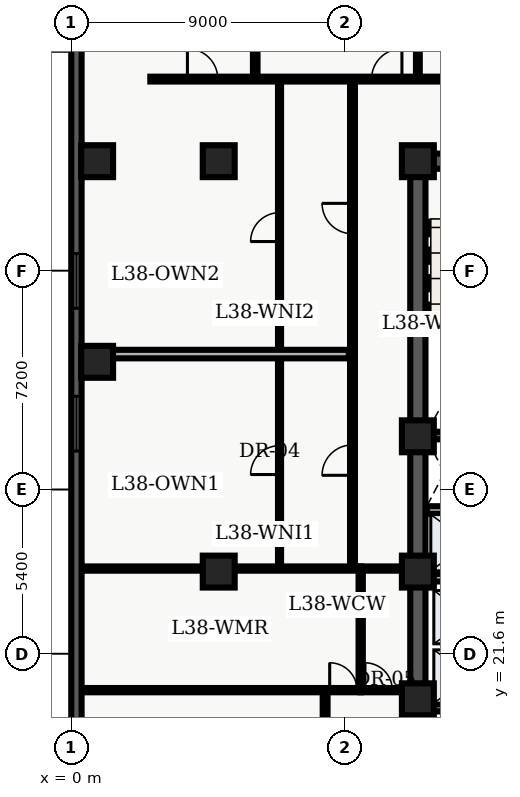
"""IFC4 building model, lengths in metres.
Left out: names, types, materials, properties, quantities, classifications, styles, units other than length and angle.
Written with IfcOpenShell. Run it as: python <this file> out.ifc"""

import sys

from ifc_helpers import new_model, entity, si_unit, converted_unit, direction, frame, origin_with_axes, origin_2d_with_axis, place, context, subcontext, project, spatial, polyline, rectangle, outline, extrude, element, fill, save


model = new_model("IFC4")
c1 = context("Model", 3, precision=1e-05, world=origin_with_axes(), true_north=direction((0.0, 1.0)))
c2 = subcontext(c1, "Body", "Model", "MODEL_VIEW")
j1 = project(units=[si_unit("LENGTHUNIT", "METRE"), converted_unit("PLANEANGLEUNIT", "DEGREE", entity("IfcPlaneAngleMeasure", 0.017), si_unit("PLANEANGLEUNIT", "RADIAN"), dimensions=[0, 0, 0, 0, 0, 0, 0])], contexts=[c1])
p1 = place(None, origin_with_axes())
s1 = spatial("IfcSite", under=j1, at=p1, CompositionType="ELEMENT")
p2 = place(p1, origin_with_axes())
s2 = spatial("IfcBuilding", under=s1, at=p2, CompositionType="ELEMENT")
p3 = place(p2, frame((0.0, 0.0, 156.3), z_axis=(0.0, 0.0, 1.0), x_axis=(1.0, 0.0, 0.0)))
s3 = spatial("IfcBuildingStorey", under=s2, at=p3, CompositionType="ELEMENT", Elevation=156.3)
p4 = place(p3, frame((11.4, 10.8, 0.0), z_axis=(0.0, 0.0, 1.0), x_axis=(0.0, 1.0, 0.0)))
e1 = element("IfcWall", 1, at=p4, inside=s3, PredefinedType="SHEAR", context=c2, shape_type="SweptSolid", body=[
    extrude(outline(polyline([(0.0, -0.25), (27.0, -0.25), (27.0, 0.25), (0.0, 0.25), (0.0, -0.25)])), origin_with_axes(), (0.0, 0.0, 1.0), 3.66),
])
p5 = place(p3, frame((11.4, 37.8, 0.0), z_axis=(0.0, 0.0, 1.0), x_axis=(1.0, 0.0, 0.0)))
e2 = element("IfcWall", 2, at=p5, inside=s3, PredefinedType="SHEAR", context=c2, shape_type="SweptSolid", body=[
    extrude(outline(polyline([(0.0, -0.25), (7.2, -0.25), (7.2, 0.25), (0.0, 0.25), (0.0, -0.25)])), origin_with_axes(), (0.0, 0.0, 1.0), 3.66),
])
p6 = place(p5, frame((2.625, 0.0, 0.0), z_axis=(0.0, 0.0, 1.0), x_axis=(1.0, 0.0, 0.0)))
e3 = element("IfcOpeningElement", 3, at=p6, cuts=e2, PredefinedType="OPENING", context=c2, shape_type="SweptSolid", body=[
    extrude(rectangle(XDim=1.05, YDim=0.52, at=origin_2d_with_axis()), origin_with_axes(), (0.0, 0.0, 1.0), 2.15),
])
for number, where, z_axis, x_axis in (
    (4, (11.65, 19.825, 0.0), (0.0, 0.0, 1.0), (1.0, 0.0, 0.0)),
    (5, (11.65, 28.775, 0.0), (0.0, 0.0, 1.0), (1.0, 0.0, 0.0)),
):
    element("IfcWall", number, at=place(p3, frame(where, z_axis=z_axis, x_axis=x_axis)), inside=s3, PredefinedType="SHEAR", context=c2, shape_type="SweptSolid", body=[
        extrude(outline(polyline([(0.0, -0.125), (6.7, -0.125), (6.7, 0.125), (0.0, 0.125), (0.0, -0.125)])), origin_with_axes(), (0.0, 0.0, 1.0), 3.66),
    ])
p7 = place(p3, frame((11.7, 24.1, 0.0), z_axis=(0.0, 0.0, 1.0), x_axis=(1.0, 0.0, 0.0)))
e6 = element("IfcWall", 6, at=p7, inside=s3, PredefinedType="SOLIDWALL", context=c2, shape_type="SweptSolid", body=[
    extrude(outline(polyline([(0.0, -0.125), (6.6, -0.125), (6.6, 0.125), (0.0, 0.125), (0.0, -0.125)])), origin_with_axes(), (0.0, 0.0, 1.0), 2.7),
])
p8 = place(p7, frame((3.75, 0.0, 0.0), z_axis=(0.0, 0.0, 1.0), x_axis=(1.0, 0.0, 0.0)))
e7 = element("IfcOpeningElement", 7, at=p8, cuts=e6, PredefinedType="OPENING", context=c2, shape_type="SweptSolid", body=[
    extrude(rectangle(XDim=0.9, YDim=0.27, at=origin_2d_with_axis()), origin_with_axes(), (0.0, 0.0, 1.0), 2.15),
])
p9 = place(p3, frame((11.7, 26.325, 0.0), z_axis=(0.0, 0.0, 1.0), x_axis=(1.0, 0.0, 0.0)))
e8 = element("IfcWall", 8, at=p9, inside=s3, PredefinedType="SOLIDWALL", context=c2, shape_type="SweptSolid", body=[
    extrude(outline(polyline([(0.0, -0.125), (6.6, -0.125), (6.6, 0.125), (0.0, 0.125), (0.0, -0.125)])), origin_with_axes(), (0.0, 0.0, 1.0), 2.7),
])
p10 = place(p9, frame((3.5, 0.0, 0.0), z_axis=(0.0, 0.0, 1.0), x_axis=(1.0, 0.0, 0.0)))
e9 = element("IfcOpeningElement", 9, at=p10, cuts=e8, PredefinedType="OPENING", context=c2, shape_type="SweptSolid", body=[
    extrude(rectangle(XDim=0.9, YDim=0.27, at=origin_2d_with_axis()), origin_with_axes(), (0.0, 0.0, 1.0), 2.15),
])
for number, where, z_axis, x_axis in (
    (10, (11.4, 20.1, 0.0), (0.0, 0.0, 1.0), (1.0, 0.0, 0.0)),
    (11, (11.4, 24.3, 0.0), (0.0, 0.0, 1.0), (1.0, 0.0, 0.0)),
    (12, (11.4, 28.75, 0.0), (0.0, 0.0, 1.0), (1.0, 0.0, 0.0)),
    (13, (11.4, 37.8, 0.0), (0.0, 0.0, 1.0), (1.0, 0.0, 0.0)),
    (14, (4.85, 24.3, 0.0), (0.0, 0.0, 1.0), (1.0, 0.0, 0.0)),
    (15, (4.85, 37.8, 0.0), (0.0, 0.0, 1.0), (1.0, 0.0, 0.0)),
    (16, (0.85, 31.2, 0.0), (0.0, 0.0, 1.0), (1.0, 0.0, 0.0)),
    (17, (0.85, 37.8, 0.0), (0.0, 0.0, 1.0), (1.0, 0.0, 0.0)),
):
    element("IfcColumn", number, at=place(p3, frame(where, z_axis=z_axis, x_axis=x_axis)), inside=s3, PredefinedType="COLUMN", context=c2, shape_type="SweptSolid", body=[
        extrude(rectangle(XDim=1.05, YDim=1.05, at=origin_2d_with_axis()), origin_with_axes(), (0.0, 0.0, 1.0), 3.9),
    ])
p11 = place(p3, frame((9.52, 20.4, 0.0), z_axis=(0.0, 0.0, 1.0), x_axis=(0.0, 1.0, 0.0)))
e18 = element("IfcWall", 18, at=p11, inside=s3, PredefinedType="PARTITIONING", context=c2, shape_type="SweptSolid", body=[
    extrude(outline(polyline([(0.0, -0.07), (4.0, -0.07), (4.0, 0.07), (0.0, 0.07), (0.0, -0.07)])), origin_with_axes(), (0.0, 0.0, 1.0), 2.7),
])
p12 = place(p3, frame((9.52, 20.4, 0.0), z_axis=(0.0, 0.0, 1.0), x_axis=(1.0, 0.0, 0.0)))
e19 = element("IfcWall", 19, at=p12, inside=s3, PredefinedType="PARTITIONING", context=c2, shape_type="SweptSolid", body=[
    extrude(outline(polyline([(0.0, -0.07), (1.58, -0.07), (1.58, 0.07), (0.0, 0.07), (0.0, -0.07)])), origin_with_axes(), (0.0, 0.0, 1.0), 2.7),
])
p13 = place(p12, frame((0.59, 0.0, 0.0), z_axis=(0.0, 0.0, 1.0), x_axis=(1.0, 0.0, 0.0)))
e20 = element("IfcOpeningElement", 20, at=p13, cuts=e19, PredefinedType="OPENING", context=c2, shape_type="SweptSolid", body=[
    extrude(rectangle(XDim=0.9, YDim=0.16, at=origin_2d_with_axis()), origin_with_axes(), (0.0, 0.0, 1.0), 2.15),
])
p14 = place(p3, frame((9.52, 24.4, 0.0), z_axis=(0.0, 0.0, 1.0), x_axis=(1.0, 0.0, 0.0)))
e21 = element("IfcWall", 21, at=p14, inside=s3, PredefinedType="PARTITIONING", context=c2, shape_type="SweptSolid", body=[
    extrude(outline(polyline([(0.0, -0.07), (1.58, -0.07), (1.58, 0.07), (0.0, 0.07), (0.0, -0.07)])), origin_with_axes(), (0.0, 0.0, 1.0), 2.7),
])
p15 = place(p3, frame((2.6, 40.5, 0.0), z_axis=(0.0, 0.0, 1.0), x_axis=(1.0, 0.0, 0.0)))
e22 = element("IfcWall", 22, at=p15, inside=s3, PredefinedType="PARTITIONING", context=c2, shape_type="SweptSolid", body=[
    extrude(outline(polyline([(0.0, -0.08), (20.117, -0.08), (20.117, 0.08), (0.0, 0.08), (0.0, -0.08)])), origin_with_axes(), (0.0, 0.0, 1.0), 2.7),
])
p16 = place(p15, frame((1.72, 0.0, 0.0), z_axis=(0.0, 0.0, 1.0), x_axis=(1.0, 0.0, 0.0)))
e23 = element("IfcOpeningElement", 23, at=p16, cuts=e22, PredefinedType="OPENING", context=c2, shape_type="SweptSolid", body=[
    extrude(rectangle(XDim=1.0, YDim=0.18, at=origin_2d_with_axis()), origin_with_axes(), (0.0, 0.0, 1.0), 2.15),
])
p17 = place(p15, frame((7.776, 0.0, 0.0), z_axis=(0.0, 0.0, 1.0), x_axis=(1.0, 0.0, 0.0)))
e24 = element("IfcOpeningElement", 24, at=p17, cuts=e22, PredefinedType="OPENING", context=c2, shape_type="SweptSolid", body=[
    extrude(rectangle(XDim=1.0, YDim=0.18, at=origin_2d_with_axis()), origin_with_axes(), (0.0, 0.0, 1.0), 2.15),
])
p18 = place(p15, frame((11.113, 0.0, 0.0), z_axis=(0.0, 0.0, 1.0), x_axis=(1.0, 0.0, 0.0)))
e25 = element("IfcOpeningElement", 25, at=p18, cuts=e22, PredefinedType="OPENING", context=c2, shape_type="SweptSolid", body=[
    extrude(rectangle(XDim=1.0, YDim=0.18, at=origin_2d_with_axis()), origin_with_axes(), (0.0, 0.0, 1.0), 2.15),
])
p19 = place(p15, frame((14.352, 0.0, 0.0), z_axis=(0.0, 0.0, 1.0), x_axis=(1.0, 0.0, 0.0)))
e26 = element("IfcOpeningElement", 26, at=p19, cuts=e22, PredefinedType="OPENING", context=c2, shape_type="SweptSolid", body=[
    extrude(rectangle(XDim=1.0, YDim=0.18, at=origin_2d_with_axis()), origin_with_axes(), (0.0, 0.0, 1.0), 2.15),
])
p20 = place(p3, frame((8.35, 7.8, 0.0), z_axis=(0.0, 0.0, 1.0), x_axis=(0.0, 1.0, 0.0)))
e27 = element("IfcWall", 27, at=p20, inside=s3, PredefinedType="PARTITIONING", context=c2, shape_type="SweptSolid", body=[
    extrude(outline(polyline([(0.0, -0.08), (12.6, -0.08), (12.6, 0.08), (0.0, 0.08), (0.0, -0.08)])), origin_with_axes(), (0.0, 0.0, 1.0), 2.7),
])
p21 = place(p20, frame((2.893, 0.0, 0.0), z_axis=(0.0, 0.0, 1.0), x_axis=(1.0, 0.0, 0.0)))
e28 = element("IfcOpeningElement", 28, at=p21, cuts=e27, PredefinedType="OPENING", context=c2, shape_type="SweptSolid", body=[
    extrude(rectangle(XDim=1.0, YDim=0.18, at=origin_2d_with_axis()), origin_with_axes(), (0.0, 0.0, 1.0), 2.15),
])
p22 = place(p20, frame((9.088, 0.0, 0.0), z_axis=(0.0, 0.0, 1.0), x_axis=(1.0, 0.0, 0.0)))
e29 = element("IfcOpeningElement", 29, at=p22, cuts=e27, PredefinedType="OPENING", context=c2, shape_type="SweptSolid", body=[
    extrude(rectangle(XDim=1.0, YDim=0.18, at=origin_2d_with_axis()), origin_with_axes(), (0.0, 0.0, 1.0), 2.15),
])
p23 = place(p3, frame((9.25, 24.4, 0.0), z_axis=(0.0, 0.0, 1.0), x_axis=(0.0, 1.0, 0.0)))
e30 = element("IfcWall", 30, at=p23, inside=s3, PredefinedType="PARTITIONING", context=c2, shape_type="SweptSolid", body=[
    extrude(outline(polyline([(0.0, -0.08), (16.1, -0.08), (16.1, 0.08), (0.0, 0.08), (0.0, -0.08)])), origin_with_axes(), (0.0, 0.0, 1.0), 2.7),
])
p24 = place(p23, frame((3.567, 0.0, 0.0), z_axis=(0.0, 0.0, 1.0), x_axis=(1.0, 0.0, 0.0)))
e31 = element("IfcOpeningElement", 31, at=p24, cuts=e30, PredefinedType="OPENING", context=c2, shape_type="SweptSolid", body=[
    extrude(rectangle(XDim=1.0, YDim=0.18, at=origin_2d_with_axis()), origin_with_axes(), (0.0, 0.0, 1.0), 2.15),
])
p25 = place(p23, frame((11.512, 0.0, 0.0), z_axis=(0.0, 0.0, 1.0), x_axis=(1.0, 0.0, 0.0)))
e32 = element("IfcOpeningElement", 32, at=p25, cuts=e30, PredefinedType="OPENING", context=c2, shape_type="SweptSolid", body=[
    extrude(rectangle(XDim=1.0, YDim=0.18, at=origin_2d_with_axis()), origin_with_axes(), (0.0, 0.0, 1.0), 2.15),
])
p26 = place(p3, frame((0.335, 20.4, 0.0), z_axis=(0.0, 0.0, 1.0), x_axis=(1.0, 0.0, 0.0)))
e33 = element("IfcWall", 33, at=p26, inside=s3, PredefinedType="PARTITIONING", context=c2, shape_type="SweptSolid", body=[
    extrude(outline(polyline([(0.0, -0.07), (9.185, -0.07), (9.185, 0.07), (0.0, 0.07), (0.0, -0.07)])), origin_with_axes(), (0.0, 0.0, 1.0), 2.7),
])
p27 = place(p26, frame((8.615, 0.0, 0.0), z_axis=(0.0, 0.0, 1.0), x_axis=(1.0, 0.0, 0.0)))
e34 = element("IfcOpeningElement", 34, at=p27, cuts=e33, PredefinedType="OPENING", context=c2, shape_type="SweptSolid", body=[
    extrude(rectangle(XDim=0.9, YDim=0.16, at=origin_2d_with_axis()), origin_with_axes(), (0.0, 0.0, 1.0), 2.15),
])
p28 = place(p3, frame((0.335, 24.4, 0.0), z_axis=(0.0, 0.0, 1.0), x_axis=(1.0, 0.0, 0.0)))
e35 = element("IfcWall", 35, at=p28, inside=s3, PredefinedType="PARTITIONING", context=c2, shape_type="SweptSolid", body=[
    extrude(outline(polyline([(0.0, -0.07), (9.185, -0.07), (9.185, 0.07), (0.0, 0.07), (0.0, -0.07)])), origin_with_axes(), (0.0, 0.0, 1.0), 2.7),
])
p29 = place(p3, frame((6.85, 24.55, 0.0), z_axis=(0.0, 0.0, 1.0), x_axis=(0.0, 1.0, 0.0)))
e36 = element("IfcWall", 36, at=p29, inside=s3, PredefinedType="PARTITIONING", context=c2, shape_type="SweptSolid", body=[
    extrude(outline(polyline([(0.0, -0.05), (15.75, -0.05), (15.75, 0.05), (0.0, 0.05), (0.0, -0.05)])), origin_with_axes(), (0.0, 0.0, 1.0), 2.7),
])
p30 = place(p29, frame((3.417, 0.0, 0.0), z_axis=(0.0, 0.0, 1.0), x_axis=(1.0, 0.0, 0.0)))
e37 = element("IfcOpeningElement", 37, at=p30, cuts=e36, PredefinedType="OPENING", context=c2, shape_type="SweptSolid", body=[
    extrude(rectangle(XDim=0.95, YDim=0.12, at=origin_2d_with_axis()), origin_with_axes(), (0.0, 0.0, 1.0), 2.15),
])
p31 = place(p29, frame((11.082, 0.0, 0.0), z_axis=(0.0, 0.0, 1.0), x_axis=(1.0, 0.0, 0.0)))
e38 = element("IfcOpeningElement", 38, at=p31, cuts=e36, PredefinedType="OPENING", context=c2, shape_type="SweptSolid", body=[
    extrude(rectangle(XDim=0.95, YDim=0.12, at=origin_2d_with_axis()), origin_with_axes(), (0.0, 0.0, 1.0), 2.15),
])
p32 = place(p3, frame((0.335, 31.455, 0.0), z_axis=(0.0, 0.0, 1.0), x_axis=(1.0, 0.0, 0.0)))
e39 = element("IfcWall", 39, at=p32, inside=s3, PredefinedType="PARTITIONING", context=c2, shape_type="SweptSolid", body=[
    extrude(outline(polyline([(0.0, -0.14), (8.795, -0.14), (8.795, 0.14), (0.0, 0.14), (0.0, -0.14)])), origin_with_axes(), (0.0, 0.0, 1.0), 2.7),
])
p33 = place(p3, frame((6.051, 40.6, 0.0), z_axis=(0.0, 0.0, 1.0), x_axis=(0.0, 1.0, 0.0)))
e40 = element("IfcWall", 40, at=p33, inside=s3, PredefinedType="PARTITIONING", context=c2, shape_type="SweptSolid", body=[
    extrude(outline(polyline([(0.0, -0.075), (7.665, -0.075), (7.665, 0.075), (0.0, 0.075), (0.0, -0.075)])), origin_with_axes(), (0.0, 0.0, 1.0), 2.7),
])
p34 = place(p3, frame((11.4, 40.6, 0.0), z_axis=(0.0, 0.0, 1.0), x_axis=(0.0, 1.0, 0.0)))
e41 = element("IfcWall", 41, at=p34, inside=s3, PredefinedType="PARTITIONING", context=c2, shape_type="SweptSolid", body=[
    extrude(outline(polyline([(0.0, -0.062), (7.665, -0.062), (7.665, 0.062), (0.0, 0.062), (0.0, -0.062)])), origin_with_axes(), (0.0, 0.0, 1.0), 2.7),
])
p35 = place(p3, frame((0.17, 2.74, 0.0), z_axis=(0.0, 0.0, 1.0), x_axis=(0.0, 1.0, 0.0)))
e42 = element("IfcWall", 42, at=p35, inside=s3, PredefinedType="SOLIDWALL", context=c2, shape_type="SweptSolid", body=[
    extrude(outline(polyline([(0.0, -0.17), (43.46, -0.17), (43.46, 0.17), (0.0, 0.17), (0.0, -0.17)])), origin_with_axes(), (0.0, 0.0, 1.0), 3.66),
])
p36 = place(p35, frame((2.948, 0.0, 0.45), z_axis=(0.0, 0.0, 1.0), x_axis=(1.0, 0.0, 0.0)))
e43 = element("IfcOpeningElement", 43, at=p36, cuts=e42, PredefinedType="OPENING", context=c2, shape_type="SweptSolid", body=[
    extrude(rectangle(XDim=1.8, YDim=0.36, at=origin_2d_with_axis()), origin_with_axes(), (0.0, 0.0, 1.0), 2.1),
])
p37 = place(p35, frame((12.339, 0.0, 0.45), z_axis=(0.0, 0.0, 1.0), x_axis=(1.0, 0.0, 0.0)))
e44 = element("IfcOpeningElement", 44, at=p37, cuts=e42, PredefinedType="OPENING", context=c2, shape_type="SweptSolid", body=[
    extrude(rectangle(XDim=1.8, YDim=0.36, at=origin_2d_with_axis()), origin_with_axes(), (0.0, 0.0, 1.0), 2.1),
])
p38 = place(p35, frame((26.426, 0.0, 0.45), z_axis=(0.0, 0.0, 1.0), x_axis=(1.0, 0.0, 0.0)))
e45 = element("IfcOpeningElement", 45, at=p38, cuts=e42, PredefinedType="OPENING", context=c2, shape_type="SweptSolid", body=[
    extrude(rectangle(XDim=1.8, YDim=0.36, at=origin_2d_with_axis()), origin_with_axes(), (0.0, 0.0, 1.0), 2.1),
])
p39 = place(p35, frame((31.121, 0.0, 0.45), z_axis=(0.0, 0.0, 1.0), x_axis=(1.0, 0.0, 0.0)))
e46 = element("IfcOpeningElement", 46, at=p39, cuts=e42, PredefinedType="OPENING", context=c2, shape_type="SweptSolid", body=[
    extrude(rectangle(XDim=1.8, YDim=0.36, at=origin_2d_with_axis()), origin_with_axes(), (0.0, 0.0, 1.0), 2.1),
])
p40 = place(p35, frame((40.062, 0.0, 0.45), z_axis=(0.0, 0.0, 1.0), x_axis=(1.0, 0.0, 0.0)))
e47 = element("IfcOpeningElement", 47, at=p40, cuts=e42, PredefinedType="OPENING", context=c2, shape_type="SweptSolid", body=[
    extrude(rectangle(XDim=1.8, YDim=0.36, at=origin_2d_with_axis()), origin_with_axes(), (0.0, 0.0, 1.0), 2.1),
])
p41 = place(p12, frame((0.59, 0.0, 0.0), z_axis=(0.0, 0.0, 1.0), x_axis=(1.0, 0.0, 0.0)))
e48 = element("IfcDoor", 48, at=p41, inside=s3, OperationType="SINGLE_SWING_LEFT", PredefinedType="DOOR", context=c2, shape_type="SweptSolid", body=[
    extrude(rectangle(XDim=0.9, YDim=0.084, at=origin_2d_with_axis()), origin_with_axes(), (0.0, 0.0, 1.0), 2.15),
])
fill(e20, e48)
p42 = place(p26, frame((8.615, 0.0, 0.0), z_axis=(0.0, 0.0, 1.0), x_axis=(1.0, 0.0, 0.0)))
e49 = element("IfcDoor", 49, at=p42, inside=s3, OperationType="SINGLE_SWING_LEFT", PredefinedType="DOOR", context=c2, shape_type="SweptSolid", body=[
    extrude(rectangle(XDim=0.9, YDim=0.084, at=origin_2d_with_axis()), origin_with_axes(), (0.0, 0.0, 1.0), 2.15),
])
fill(e34, e49)
p43 = place(p29, frame((3.417, 0.0, 0.0), z_axis=(0.0, 0.0, 1.0), x_axis=(1.0, 0.0, 0.0)))
e50 = element("IfcDoor", 50, at=p43, inside=s3, OperationType="SINGLE_SWING_LEFT", PredefinedType="DOOR", context=c2, shape_type="SweptSolid", body=[
    extrude(rectangle(XDim=0.95, YDim=0.06, at=origin_2d_with_axis()), origin_with_axes(), (0.0, 0.0, 1.0), 2.15),
])
fill(e37, e50)
p44 = place(p23, frame((3.567, 0.0, 0.0), z_axis=(0.0, 0.0, 1.0), x_axis=(1.0, 0.0, 0.0)))
e51 = element("IfcDoor", 51, at=p44, inside=s3, OperationType="SINGLE_SWING_LEFT", PredefinedType="DOOR", context=c2, shape_type="SweptSolid", body=[
    extrude(rectangle(XDim=1.0, YDim=0.09, at=origin_2d_with_axis()), origin_with_axes(), (0.0, 0.0, 1.0), 2.15),
])
fill(e31, e51)
p45 = place(p29, frame((11.082, 0.0, 0.0), z_axis=(0.0, 0.0, 1.0), x_axis=(1.0, 0.0, 0.0)))
e52 = element("IfcDoor", 52, at=p45, inside=s3, OperationType="SINGLE_SWING_LEFT", PredefinedType="DOOR", context=c2, shape_type="SweptSolid", body=[
    extrude(rectangle(XDim=0.95, YDim=0.06, at=origin_2d_with_axis()), origin_with_axes(), (0.0, 0.0, 1.0), 2.15),
])
fill(e38, e52)
p46 = place(p23, frame((11.512, 0.0, 0.0), z_axis=(0.0, 0.0, 1.0), x_axis=(1.0, 0.0, 0.0)))
e53 = element("IfcDoor", 53, at=p46, inside=s3, OperationType="SINGLE_SWING_RIGHT", PredefinedType="DOOR", context=c2, shape_type="SweptSolid", body=[
    extrude(rectangle(XDim=1.0, YDim=0.09, at=origin_2d_with_axis()), origin_with_axes(), (0.0, 0.0, 1.0), 2.15),
])
fill(e32, e53)
p47 = place(p15, frame((1.72, 0.0, 0.0), z_axis=(0.0, 0.0, 1.0), x_axis=(1.0, 0.0, 0.0)))
e54 = element("IfcDoor", 54, at=p47, inside=s3, OperationType="SINGLE_SWING_LEFT", PredefinedType="DOOR", context=c2, shape_type="SweptSolid", body=[
    extrude(rectangle(XDim=1.0, YDim=0.09, at=origin_2d_with_axis()), origin_with_axes(), (0.0, 0.0, 1.0), 2.15),
])
fill(e23, e54)
p48 = place(p15, frame((7.776, 0.0, 0.0), z_axis=(0.0, 0.0, 1.0), x_axis=(1.0, 0.0, 0.0)))
e55 = element("IfcDoor", 55, at=p48, inside=s3, OperationType="SINGLE_SWING_RIGHT", PredefinedType="DOOR", context=c2, shape_type="SweptSolid", body=[
    extrude(rectangle(XDim=1.0, YDim=0.09, at=origin_2d_with_axis()), origin_with_axes(), (0.0, 0.0, 1.0), 2.15),
])
fill(e24, e55)
p49 = place(p35, frame((26.426, 0.0, 0.45), z_axis=(0.0, 0.0, 1.0), x_axis=(1.0, 0.0, 0.0)))
e56 = element("IfcWindow", 56, at=p49, inside=s3, PredefinedType="WINDOW", context=c2, shape_type="SweptSolid", body=[
    extrude(rectangle(XDim=1.8, YDim=0.09, at=origin_2d_with_axis()), origin_with_axes(), (0.0, 0.0, 1.0), 2.1),
])
fill(e45, e56)
p50 = place(p35, frame((31.121, 0.0, 0.45), z_axis=(0.0, 0.0, 1.0), x_axis=(1.0, 0.0, 0.0)))
e57 = element("IfcWindow", 57, at=p50, inside=s3, PredefinedType="WINDOW", context=c2, shape_type="SweptSolid", body=[
    extrude(rectangle(XDim=1.8, YDim=0.09, at=origin_2d_with_axis()), origin_with_axes(), (0.0, 0.0, 1.0), 2.1),
])
fill(e46, e57)
save(model, sys.argv[1])
